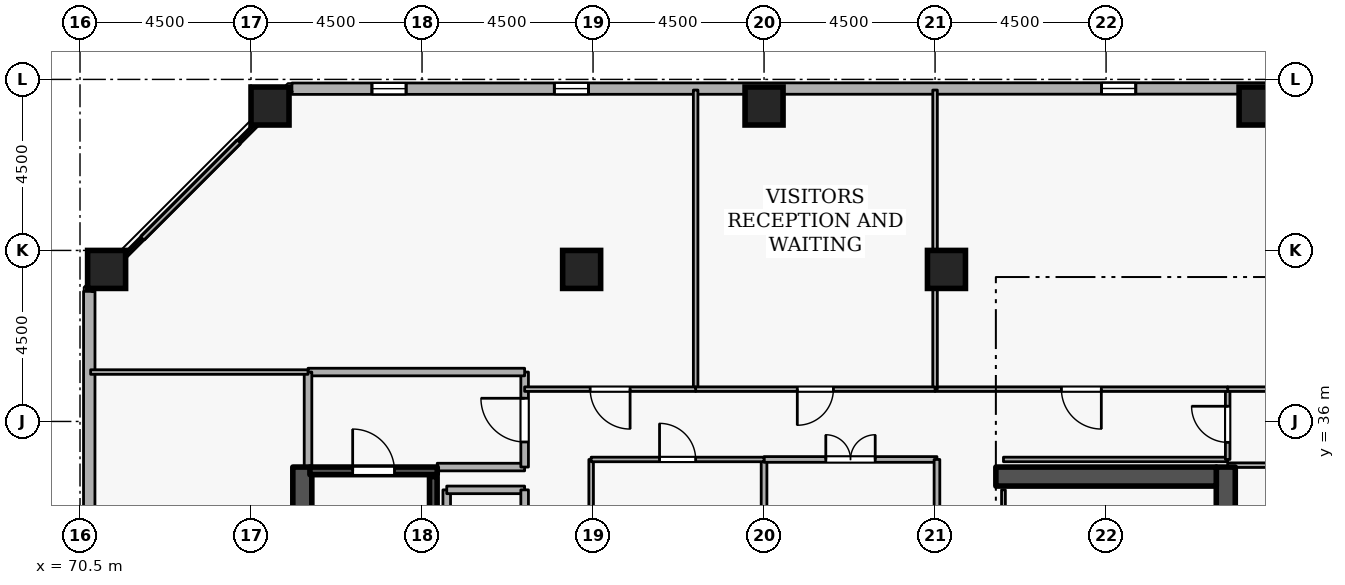
"""IFC4 building model, lengths in metres.
Left out: names, types, materials, properties, quantities, classifications, styles, units other than length and angle.
Written with IfcOpenShell. Run it as: python <this file> out.ifc"""

import sys

from ifc_helpers import new_model, si_unit, direction, frame, frame_2d, origin, origin_2d, place, context, subcontext, project, spatial, rectangle, extrude, element, fill, save


model = new_model("IFC4")
c1 = context("Model", 3, precision=1e-05, world=origin(), true_north=direction((0.0, 1.0)))
c2 = subcontext(c1, "Body", "Model", "MODEL_VIEW")
j1 = project(units=[si_unit("LENGTHUNIT", "METRE"), si_unit("PLANEANGLEUNIT", "RADIAN")], contexts=[c1])
p1 = place(None, origin())
s1 = spatial("IfcSite", under=j1, at=p1, CompositionType="ELEMENT")
p2 = place(p1, origin())
s2 = spatial("IfcBuilding", under=s1, at=p2, CompositionType="ELEMENT")
p3 = place(p2, frame((0.0, 0.0, 240.3)))
s3 = spatial("IfcBuildingStorey", under=s2, at=p3, CompositionType="ELEMENT", Elevation=240.3)
p4 = place(p3, frame((100.65, 19.2, 0.0), z_axis=(0.0, 0.0, 1.0), x_axis=(0.0, 1.0, 0.0)))
e1 = element("IfcWall", 1, at=p4, inside=s3, PredefinedType="SHEAR", context=c2, shape_type="SweptSolid", body=[
    extrude(rectangle(XDim=15.6, YDim=0.5, at=frame_2d((7.8, 0.0))), origin(), (0.0, 0.0, 1.0), 3.6),
])
p5 = place(p3, frame((94.6, 34.55, 0.0), z_axis=(0.0, 0.0, 1.0), x_axis=(1.0, 0.0, 0.0)))
e2 = element("IfcWall", 2, at=p5, inside=s3, PredefinedType="SHEAR", context=c2, shape_type="SweptSolid", body=[
    extrude(rectangle(XDim=5.8, YDim=0.5, at=frame_2d((2.9, 0.0))), origin(), (0.0, 0.0, 1.0), 3.6),
])
p6 = place(p3, frame((76.35, 19.2, 0.0), z_axis=(0.0, 0.0, 1.0), x_axis=(0.0, 1.0, 0.0)))
e3 = element("IfcWall", 3, at=p6, inside=s3, PredefinedType="SHEAR", context=c2, shape_type="SweptSolid", body=[
    extrude(rectangle(XDim=15.6, YDim=0.5, at=frame_2d((7.8, 0.0))), origin(), (0.0, 0.0, 1.0), 3.6),
])
for number, where, z_axis, x_axis in (
    (4, (101.5, 44.3, 0.0), (0.0, 0.0, 1.0), (1.0, 0.0, 0.0)),
    (5, (88.5, 44.3, 0.0), (0.0, 0.0, 1.0), (1.0, 0.0, 0.0)),
    (6, (75.5, 44.3, 0.0), (0.0, 0.0, 1.0), (1.0, 0.0, 0.0)),
    (7, (71.2, 40.0, 0.0), (0.0, 0.0, 1.0), (1.0, 0.0, 0.0)),
    (8, (93.3, 40.0, 0.0), (0.0, 0.0, 1.0), (1.0, 0.0, 0.0)),
    (9, (83.7, 40.0, 0.0), (0.0, 0.0, 1.0), (1.0, 0.0, 0.0)),
):
    element("IfcColumn", number, at=place(p3, frame(where, z_axis=z_axis, x_axis=x_axis)), inside=s3, PredefinedType="COLUMN", context=c2, shape_type="SweptSolid", body=[
        extrude(rectangle(XDim=1.0, YDim=1.0, at=origin_2d()), origin(), (0.0, 0.0, 1.0), 3.6),
    ])
p7 = place(p3, frame((109.681, 44.765, 0.0), z_axis=(0.0, 0.0, 1.0), x_axis=(-0.999999963872, -0.000268805477, 0.0)))
e10 = element("IfcWall", 10, at=p7, inside=s3, PredefinedType="STANDARD", context=c2, shape_type="SweptSolid", body=[
    extrude(rectangle(XDim=33.605, YDim=0.3, at=frame_2d((16.802, 0.0))), origin(), (0.0, 0.0, 1.0), 2.7),
])
p8 = place(p7, frame((1.8, 0.0, 0.72)))
e11 = element("IfcOpeningElement", 11, at=p8, cuts=e10, PredefinedType="OPENING", context=c2, shape_type="SweptSolid", body=[
    extrude(rectangle(XDim=0.9, YDim=1.75, at=frame_2d((0.45, 0.875))), frame((0.0, 0.16, 0.0), z_axis=(0.0, -1.0, 0.0), x_axis=(1.0, 0.0, 0.0)), (0.0, 0.0, 1.0), 0.32),
])
p9 = place(p7, frame((11.4, 0.0, 0.72)))
e12 = element("IfcOpeningElement", 12, at=p9, cuts=e10, PredefinedType="OPENING", context=c2, shape_type="SweptSolid", body=[
    extrude(rectangle(XDim=0.9, YDim=1.75, at=frame_2d((0.45, 0.875))), frame((0.0, 0.16, 0.0), z_axis=(0.0, -1.0, 0.0), x_axis=(1.0, 0.0, 0.0)), (0.0, 0.0, 1.0), 0.32),
])
p10 = place(p7, frame((25.8, 0.0, 0.72)))
e13 = element("IfcOpeningElement", 13, at=p10, cuts=e10, PredefinedType="OPENING", context=c2, shape_type="SweptSolid", body=[
    extrude(rectangle(XDim=0.9, YDim=1.75, at=frame_2d((0.45, 0.875))), frame((0.0, 0.16, 0.0), z_axis=(0.0, -1.0, 0.0), x_axis=(1.0, 0.0, 0.0)), (0.0, 0.0, 1.0), 0.32),
])
p11 = place(p7, frame((30.6, 0.0, 0.72)))
e14 = element("IfcOpeningElement", 14, at=p11, cuts=e10, PredefinedType="OPENING", context=c2, shape_type="SweptSolid", body=[
    extrude(rectangle(XDim=0.9, YDim=1.75, at=frame_2d((0.45, 0.875))), frame((0.0, 0.16, 0.0), z_axis=(0.0, -1.0, 0.0), x_axis=(1.0, 0.0, 0.0)), (0.0, 0.0, 1.0), 0.32),
])
p12 = place(p3, frame((70.744, 39.424, 0.0), z_axis=(0.0, 0.0, 1.0), x_axis=(-0.000268805477, -0.999999963872, 0.0)))
e15 = element("IfcWall", 15, at=p12, inside=s3, PredefinedType="STANDARD", context=c2, shape_type="SweptSolid", body=[
    extrude(rectangle(XDim=33.605, YDim=0.3, at=frame_2d((16.802, 0.0))), origin(), (0.0, 0.0, 1.0), 2.7),
])
p13 = place(p12, frame((6.6, 0.0, 0.72)))
e16 = element("IfcOpeningElement", 16, at=p13, cuts=e15, PredefinedType="OPENING", context=c2, shape_type="SweptSolid", body=[
    extrude(rectangle(XDim=0.9, YDim=1.75, at=frame_2d((0.45, 0.875))), frame((0.0, 0.16, 0.0), z_axis=(0.0, -1.0, 0.0), x_axis=(1.0, 0.0, 0.0)), (0.0, 0.0, 1.0), 0.32),
])
p14 = place(p12, frame((16.2, 0.0, 0.72)))
e17 = element("IfcOpeningElement", 17, at=p14, cuts=e15, PredefinedType="OPENING", context=c2, shape_type="SweptSolid", body=[
    extrude(rectangle(XDim=0.9, YDim=1.75, at=frame_2d((0.45, 0.875))), frame((0.0, 0.16, 0.0), z_axis=(0.0, -1.0, 0.0), x_axis=(1.0, 0.0, 0.0)), (0.0, 0.0, 1.0), 0.32),
])
p15 = place(p12, frame((21.0, 0.0, 0.72)))
e18 = element("IfcOpeningElement", 18, at=p15, cuts=e15, PredefinedType="OPENING", context=c2, shape_type="SweptSolid", body=[
    extrude(rectangle(XDim=0.9, YDim=1.75, at=frame_2d((0.45, 0.875))), frame((0.0, 0.16, 0.0), z_axis=(0.0, -1.0, 0.0), x_axis=(1.0, 0.0, 0.0)), (0.0, 0.0, 1.0), 0.32),
])
p16 = place(p12, frame((30.6, 0.0, 0.72)))
e19 = element("IfcOpeningElement", 19, at=p16, cuts=e15, PredefinedType="OPENING", context=c2, shape_type="SweptSolid", body=[
    extrude(rectangle(XDim=0.9, YDim=1.75, at=frame_2d((0.45, 0.875))), frame((0.0, 0.16, 0.0), z_axis=(0.0, -1.0, 0.0), x_axis=(1.0, 0.0, 0.0)), (0.0, 0.0, 1.0), 0.32),
])
p17 = place(p3, frame((76.55, 34.7, 0.0), z_axis=(0.0, 0.0, 1.0), x_axis=(1.0, 0.0, 0.0)))
e20 = element("IfcWall", 20, at=p17, inside=s3, PredefinedType="SHEAR", context=c2, shape_type="SweptSolid", body=[
    extrude(rectangle(XDim=3.35, YDim=0.2, at=frame_2d((1.675, 0.0))), origin(), (0.0, 0.0, 1.0), 3.6),
])
p18 = place(p17, frame((1.125, 0.0, 0.0)))
e21 = element("IfcOpeningElement", 21, at=p18, cuts=e20, PredefinedType="OPENING", context=c2, shape_type="SweptSolid", body=[
    extrude(rectangle(XDim=1.1, YDim=2.1, at=frame_2d((0.55, 1.05))), frame((0.0, 0.11, 0.0), z_axis=(0.0, -1.0, 0.0), x_axis=(1.0, 0.0, 0.0)), (0.0, 0.0, 1.0), 0.22),
])
p19 = place(p3, frame((79.797, 27.45, 0.0), z_axis=(0.0, 0.0, 1.0), x_axis=(0.0, 1.0, 0.0)))
e22 = element("IfcWall", 22, at=p19, inside=s3, PredefinedType="SHEAR", context=c2, shape_type="SweptSolid", body=[
    extrude(rectangle(XDim=7.1, YDim=0.2, at=frame_2d((3.55, 0.0))), origin(), (0.0, 0.0, 1.0), 3.6),
])
p20 = place(p3, frame((79.9, 34.8, 0.0), z_axis=(0.0, 0.0, 1.0), x_axis=(1.0, 0.0, 0.0)))
e23 = element("IfcWall", 23, at=p20, inside=s3, PredefinedType="STANDARD", context=c2, shape_type="SweptSolid", body=[
    extrude(rectangle(XDim=2.3, YDim=0.2, at=frame_2d((1.15, 0.0))), origin(), (0.0, 0.0, 1.0), 2.545),
])
p21 = place(p3, frame((82.2, 34.8, 0.0), z_axis=(0.0, 0.0, 1.0), x_axis=(0.0, 1.0, 0.0)))
e24 = element("IfcWall", 24, at=p21, inside=s3, PredefinedType="STANDARD", context=c2, shape_type="SweptSolid", body=[
    extrude(rectangle(XDim=2.5, YDim=0.2, at=frame_2d((1.25, 0.0))), origin(), (0.0, 0.0, 1.0), 3.34),
])
p22 = place(p21, frame((0.66, 0.0, 0.0)))
e25 = element("IfcOpeningElement", 25, at=p22, cuts=e24, PredefinedType="OPENING", context=c2, shape_type="SweptSolid", body=[
    extrude(rectangle(XDim=1.15, YDim=2.1, at=frame_2d((0.575, 1.05))), frame((0.0, 0.11, 0.0), z_axis=(0.0, -1.0, 0.0), x_axis=(1.0, 0.0, 0.0)), (0.0, 0.0, 1.0), 0.22),
])
p23 = place(p3, frame((82.2, 37.3, 0.0), z_axis=(0.0, 0.0, 1.0), x_axis=(-1.0, 0.0, 0.0)))
e26 = element("IfcWall", 26, at=p23, inside=s3, PredefinedType="STANDARD", context=c2, shape_type="SweptSolid", body=[
    extrude(rectangle(XDim=5.7, YDim=0.2, at=frame_2d((2.85, 0.0))), origin(), (0.0, 0.0, 1.0), 3.34),
])
p24 = place(p3, frame((76.5, 37.3, 0.0), z_axis=(0.0, 0.0, 1.0), x_axis=(0.0, -1.0, 0.0)))
e27 = element("IfcWall", 27, at=p24, inside=s3, PredefinedType="STANDARD", context=c2, shape_type="SweptSolid", body=[
    extrude(rectangle(XDim=2.5, YDim=0.2, at=frame_2d((1.25, 0.0))), origin(), (0.0, 0.0, 1.0), 3.34),
])
p25 = place(p3, frame((80.15, 31.85, 0.0), z_axis=(0.0, 0.0, 1.0), x_axis=(0.0, 1.0, 0.0)))
e28 = element("IfcWall", 28, at=p25, inside=s3, PredefinedType="STANDARD", context=c2, shape_type="SweptSolid", body=[
    extrude(rectangle(XDim=2.35, YDim=0.2, at=frame_2d((1.175, 0.0))), origin(), (0.0, 0.0, 1.0), 3.34),
])
p26 = place(p3, frame((80.15, 34.2, 0.0), z_axis=(0.0, 0.0, 1.0), x_axis=(1.0, 0.0, 0.0)))
e29 = element("IfcWall", 29, at=p26, inside=s3, PredefinedType="STANDARD", context=c2, shape_type="SweptSolid", body=[
    extrude(rectangle(XDim=2.05, YDim=0.2, at=frame_2d((1.025, 0.0))), origin(), (0.0, 0.0, 1.0), 2.545),
])
p27 = place(p3, frame((82.2, 34.2, 0.0), z_axis=(0.0, 0.0, 1.0), x_axis=(0.0, -1.0, 0.0)))
e30 = element("IfcWall", 30, at=p27, inside=s3, PredefinedType="STANDARD", context=c2, shape_type="SweptSolid", body=[
    extrude(rectangle(XDim=2.35, YDim=0.2, at=frame_2d((1.175, 0.0))), origin(), (0.0, 0.0, 1.0), 3.34),
])
p28 = place(p27, frame((0.6, 0.0, 0.0)))
e31 = element("IfcOpeningElement", 31, at=p28, cuts=e30, PredefinedType="OPENING", context=c2, shape_type="SweptSolid", body=[
    extrude(rectangle(XDim=1.15, YDim=2.1, at=frame_2d((0.575, 1.05))), frame((0.0, 0.11, 0.0), z_axis=(0.0, -1.0, 0.0), x_axis=(1.0, 0.0, 0.0)), (0.0, 0.0, 1.0), 0.22),
])
p29 = place(p3, frame((94.8, 32.05, 0.0), z_axis=(0.0, 0.0, 1.0), x_axis=(0.0, 1.0, 0.0)))
e32 = element("IfcWall", 32, at=p29, inside=s3, PredefinedType="PARTITIONING", context=c2, shape_type="SweptSolid", body=[
    extrude(rectangle(XDim=2.15, YDim=0.1, at=frame_2d((1.075, 0.0))), origin(), (0.0, 0.0, 1.0), 3.34),
])
p30 = place(p29, frame((0.6, 0.0, 0.0)))
e33 = element("IfcOpeningElement", 33, at=p30, cuts=e32, PredefinedType="OPENING", context=c2, shape_type="SweptSolid", body=[
    extrude(rectangle(XDim=0.95, YDim=2.1, at=frame_2d((0.475, 1.05))), frame((0.0, 0.06, 0.0), z_axis=(0.0, -1.0, 0.0), x_axis=(1.0, 0.0, 0.0)), (0.0, 0.0, 1.0), 0.12),
])
p31 = place(p3, frame((94.8, 35.0, 0.0), z_axis=(0.0, 0.0, 1.0), x_axis=(1.0, 0.0, 0.0)))
e34 = element("IfcWall", 34, at=p31, inside=s3, PredefinedType="PARTITIONING", context=c2, shape_type="SweptSolid", body=[
    extrude(rectangle(XDim=5.9, YDim=0.12, at=frame_2d((2.95, 0.0))), origin(), (0.0, 0.0, 1.0), 3.34),
])
p32 = place(p3, frame((100.7, 35.0, 0.0), z_axis=(0.0, 0.0, 1.0), x_axis=(0.0, 1.0, 0.0)))
e35 = element("IfcWall", 35, at=p32, inside=s3, PredefinedType="PARTITIONING", context=c2, shape_type="SweptSolid", body=[
    extrude(rectangle(XDim=1.85, YDim=0.12, at=frame_2d((0.925, 0.0))), origin(), (0.0, 0.0, 1.0), 3.34),
])
p33 = place(p32, frame((0.45, 0.0, 0.0)))
e36 = element("IfcOpeningElement", 36, at=p33, cuts=e35, PredefinedType="OPENING", context=c2, shape_type="SweptSolid", body=[
    extrude(rectangle(XDim=0.95, YDim=2.1, at=frame_2d((0.475, 1.05))), frame((0.0, 0.07, 0.0), z_axis=(0.0, -1.0, 0.0), x_axis=(1.0, 0.0, 0.0)), (0.0, 0.0, 1.0), 0.14),
])
for number, where, z_axis, x_axis in (
    (37, (100.7, 36.85, 0.0), (0.0, 0.0, 1.0), (1.0, 0.0, 0.0)),
    (38, (112.22, 34.85, 0.0), (0.0, 0.0, 1.0), (-1.0, 0.0, 0.0)),
):
    element("IfcWall", number, at=place(p3, frame(where, z_axis=z_axis, x_axis=x_axis)), inside=s3, PredefinedType="PARTITIONING", context=c2, shape_type="SweptSolid", body=[
        extrude(rectangle(XDim=11.52, YDim=0.12, at=frame_2d((5.76, 0.0))), origin(), (0.0, 0.0, 1.0), 3.34),
    ])
p34 = place(p3, frame((100.7, 36.85, 0.0), z_axis=(0.0, 0.0, 1.0), x_axis=(-1.0, 0.0, 0.0)))
e39 = element("IfcWall", 39, at=p34, inside=s3, PredefinedType="PARTITIONING", context=c2, shape_type="SweptSolid", body=[
    extrude(rectangle(XDim=7.7, YDim=0.12, at=frame_2d((3.85, 0.0))), origin(), (0.0, 0.0, 1.0), 3.34),
])
p35 = place(p34, frame((3.325, 0.0, 0.0)))
e40 = element("IfcOpeningElement", 40, at=p35, cuts=e39, PredefinedType="OPENING", context=c2, shape_type="SweptSolid", body=[
    extrude(rectangle(XDim=1.05, YDim=2.1, at=frame_2d((0.525, 1.05))), frame((0.0, 0.07, 0.0), z_axis=(0.0, -1.0, 0.0), x_axis=(1.0, 0.0, 0.0)), (0.0, 0.0, 1.0), 0.14),
])
for number, where, z_axis, x_axis in (
    (41, (93.0, 36.85, 0.0), (0.0, 0.0, 1.0), (0.0, 1.0, 0.0)),
    (42, (86.7, 36.85, 0.0), (0.0, 0.0, 1.0), (0.0, 1.0, 0.0)),
):
    element("IfcWall", number, at=place(p3, frame(where, z_axis=z_axis, x_axis=x_axis)), inside=s3, PredefinedType="PARTITIONING", context=c2, shape_type="SweptSolid", body=[
        extrude(rectangle(XDim=7.87, YDim=0.12, at=frame_2d((3.935, 0.0))), origin(), (0.0, 0.0, 1.0), 3.34),
    ])
p36 = place(p3, frame((93.0, 36.85, 0.0), z_axis=(0.0, 0.0, 1.0), x_axis=(-1.0, 0.0, 0.0)))
e43 = element("IfcWall", 43, at=p36, inside=s3, PredefinedType="PARTITIONING", context=c2, shape_type="SweptSolid", body=[
    extrude(rectangle(XDim=6.3, YDim=0.12, at=frame_2d((3.15, 0.0))), origin(), (0.0, 0.0, 1.0), 3.34),
])
p37 = place(p36, frame((2.675, 0.0, 0.0)))
e44 = element("IfcOpeningElement", 44, at=p37, cuts=e43, PredefinedType="OPENING", context=c2, shape_type="SweptSolid", body=[
    extrude(rectangle(XDim=0.95, YDim=2.1, at=frame_2d((0.475, 1.05))), frame((0.0, 0.07, 0.0), z_axis=(0.0, -1.0, 0.0), x_axis=(1.0, 0.0, 0.0)), (0.0, 0.0, 1.0), 0.14),
])
p38 = place(p3, frame((76.5, 37.3, 0.0), z_axis=(0.0, 0.0, 1.0), x_axis=(-1.0, 0.0, 0.0)))
e45 = element("IfcWall", 45, at=p38, inside=s3, PredefinedType="PARTITIONING", context=c2, shape_type="SweptSolid", body=[
    extrude(rectangle(XDim=5.72, YDim=0.12, at=frame_2d((2.86, 0.0))), origin(), (0.0, 0.0, 1.0), 3.34),
])
p39 = place(p3, frame((70.78, 39.456, 0.0), z_axis=(0.0, 0.0, 1.0), x_axis=(0.707106781187, 0.707106781187, 0.0)))
e46 = element("IfcWall", 46, at=p39, inside=s3, PredefinedType="PARTITIONING", context=c2, shape_type="SweptSolid", body=[
    extrude(rectangle(XDim=7.444, YDim=0.12, at=frame_2d((3.722, 0.0))), origin(), (0.0, 0.0, 1.0), 3.34),
])
p40 = place(p3, frame((86.7, 36.85, 0.0), z_axis=(0.0, 0.0, 1.0), x_axis=(-1.0, 0.0, 0.0)))
e47 = element("IfcWall", 47, at=p40, inside=s3, PredefinedType="PARTITIONING", context=c2, shape_type="SweptSolid", body=[
    extrude(rectangle(XDim=4.5, YDim=0.12, at=frame_2d((2.25, 0.0))), origin(), (0.0, 0.0, 1.0), 3.34),
])
p41 = place(p40, frame((1.725, 0.0, 0.0)))
e48 = element("IfcOpeningElement", 48, at=p41, cuts=e47, PredefinedType="OPENING", context=c2, shape_type="SweptSolid", body=[
    extrude(rectangle(XDim=1.05, YDim=2.1, at=frame_2d((0.525, 1.05))), frame((0.0, 0.07, 0.0), z_axis=(0.0, -1.0, 0.0), x_axis=(1.0, 0.0, 0.0)), (0.0, 0.0, 1.0), 0.14),
])
p42 = place(p3, frame((88.5, 32.2, 0.0), z_axis=(0.0, 0.0, 1.0), x_axis=(0.0, 1.0, 0.0)))
e49 = element("IfcWall", 49, at=p42, inside=s3, PredefinedType="PARTITIONING", context=c2, shape_type="SweptSolid", body=[
    extrude(rectangle(XDim=2.8, YDim=0.15, at=frame_2d((1.4, 0.0))), origin(), (0.0, 0.0, 1.0), 2.878),
])
p43 = place(p3, frame((88.5, 35.0, 0.0), z_axis=(0.0, 0.0, 1.0), x_axis=(1.0, 0.0, 0.0)))
e50 = element("IfcWall", 50, at=p43, inside=s3, PredefinedType="PARTITIONING", context=c2, shape_type="SweptSolid", body=[
    extrude(rectangle(XDim=4.55, YDim=0.15, at=frame_2d((2.275, 0.0))), origin(), (0.0, 0.0, 1.0), 3.34),
])
p44 = place(p43, frame((1.625, 0.0, 0.0)))
e51 = element("IfcOpeningElement", 51, at=p44, cuts=e50, PredefinedType="OPENING", context=c2, shape_type="SweptSolid", body=[
    extrude(rectangle(XDim=1.3, YDim=2.12, at=frame_2d((0.65, 1.06))), frame((0.0, 0.085, 0.0), z_axis=(0.0, -1.0, 0.0), x_axis=(1.0, 0.0, 0.0)), (0.0, 0.0, 1.0), 0.17),
])
p45 = place(p3, frame((93.05, 35.0, 0.0), z_axis=(0.0, 0.0, 1.0), x_axis=(0.0, -1.0, 0.0)))
e52 = element("IfcWall", 52, at=p45, inside=s3, PredefinedType="PARTITIONING", context=c2, shape_type="SweptSolid", body=[
    extrude(rectangle(XDim=2.8, YDim=0.15, at=frame_2d((1.4, 0.0))), origin(), (0.0, 0.0, 1.0), 3.34),
])
p46 = place(p3, frame((83.95, 32.2, 0.0), z_axis=(0.0, 0.0, 1.0), x_axis=(0.0, 1.0, 0.0)))
e53 = element("IfcWall", 53, at=p46, inside=s3, PredefinedType="PARTITIONING", context=c2, shape_type="SweptSolid", body=[
    extrude(rectangle(XDim=2.8, YDim=0.12, at=frame_2d((1.4, 0.0))), origin(), (0.0, 0.0, 1.0), 3.34),
])
p47 = place(p3, frame((83.95, 35.0, 0.0), z_axis=(0.0, 0.0, 1.0), x_axis=(1.0, 0.0, 0.0)))
e54 = element("IfcWall", 54, at=p47, inside=s3, PredefinedType="PARTITIONING", context=c2, shape_type="SweptSolid", body=[
    extrude(rectangle(XDim=4.55, YDim=0.12, at=frame_2d((2.275, 0.0))), origin(), (0.0, 0.0, 1.0), 3.34),
])
p48 = place(p47, frame((1.8, 0.0, 0.0)))
e55 = element("IfcOpeningElement", 55, at=p48, cuts=e54, PredefinedType="OPENING", context=c2, shape_type="SweptSolid", body=[
    extrude(rectangle(XDim=0.95, YDim=2.1, at=frame_2d((0.475, 1.05))), frame((0.0, 0.07, 0.0), z_axis=(0.0, -1.0, 0.0), x_axis=(1.0, 0.0, 0.0)), (0.0, 0.0, 1.0), 0.14),
])
p49 = place(p9, origin())
e56 = element("IfcWindow", 56, at=p49, inside=s3, PartitioningType="SINGLE_PANEL", PredefinedType="WINDOW", context=c2, shape_type="SweptSolid", body=[
    extrude(rectangle(XDim=0.9, YDim=1.75, at=frame_2d((0.45, 0.875))), frame((0.0, 0.03, 0.0), z_axis=(0.0, -1.0, 0.0), x_axis=(1.0, 0.0, 0.0)), (0.0, 0.0, 1.0), 0.06),
])
fill(e12, e56)
p50 = place(p10, origin())
e57 = element("IfcWindow", 57, at=p50, inside=s3, PartitioningType="SINGLE_PANEL", PredefinedType="WINDOW", context=c2, shape_type="SweptSolid", body=[
    extrude(rectangle(XDim=0.9, YDim=1.75, at=frame_2d((0.45, 0.875))), frame((0.0, 0.03, 0.0), z_axis=(0.0, -1.0, 0.0), x_axis=(1.0, 0.0, 0.0)), (0.0, 0.0, 1.0), 0.06),
])
fill(e13, e57)
p51 = place(p11, origin())
e58 = element("IfcWindow", 58, at=p51, inside=s3, PartitioningType="SINGLE_PANEL", PredefinedType="WINDOW", context=c2, shape_type="SweptSolid", body=[
    extrude(rectangle(XDim=0.9, YDim=1.75, at=frame_2d((0.45, 0.875))), frame((0.0, 0.03, 0.0), z_axis=(0.0, -1.0, 0.0), x_axis=(1.0, 0.0, 0.0)), (0.0, 0.0, 1.0), 0.06),
])
fill(e14, e58)
p52 = place(p18, origin())
e59 = element("IfcDoor", 59, at=p52, inside=s3, OperationType="SINGLE_SWING_LEFT", PredefinedType="DOOR", context=c2, shape_type="SweptSolid", body=[
    extrude(rectangle(XDim=1.1, YDim=2.1, at=frame_2d((0.55, 1.05))), frame((0.0, 0.025, 0.0), z_axis=(0.0, -1.0, 0.0), x_axis=(1.0, 0.0, 0.0)), (0.0, 0.0, 1.0), 0.05),
])
fill(e21, e59)
p53 = place(p22, origin())
e60 = element("IfcDoor", 60, at=p53, inside=s3, OperationType="SINGLE_SWING_RIGHT", PredefinedType="DOOR", context=c2, shape_type="SweptSolid", body=[
    extrude(rectangle(XDim=1.15, YDim=2.1, at=frame_2d((0.575, 1.05))), frame((0.0, 0.025, 0.0), z_axis=(0.0, -1.0, 0.0), x_axis=(1.0, 0.0, 0.0)), (0.0, 0.0, 1.0), 0.05),
])
fill(e25, e60)
p54 = place(p33, origin())
e61 = element("IfcDoor", 61, at=p54, inside=s3, OperationType="SINGLE_SWING_RIGHT", PredefinedType="DOOR", context=c2, shape_type="SweptSolid", body=[
    extrude(rectangle(XDim=0.95, YDim=2.1, at=frame_2d((0.475, 1.05))), frame((0.0, 0.025, 0.0), z_axis=(0.0, -1.0, 0.0), x_axis=(1.0, 0.0, 0.0)), (0.0, 0.0, 1.0), 0.05),
])
fill(e36, e61)
p55 = place(p35, origin())
e62 = element("IfcDoor", 62, at=p55, inside=s3, OperationType="SINGLE_SWING_LEFT", PredefinedType="DOOR", context=c2, shape_type="SweptSolid", body=[
    extrude(rectangle(XDim=1.05, YDim=2.1, at=frame_2d((0.525, 1.05))), frame((0.0, 0.025, 0.0), z_axis=(0.0, -1.0, 0.0), x_axis=(1.0, 0.0, 0.0)), (0.0, 0.0, 1.0), 0.05),
])
fill(e40, e62)
p56 = place(p37, origin())
e63 = element("IfcDoor", 63, at=p56, inside=s3, OperationType="SINGLE_SWING_RIGHT", PredefinedType="DOOR", context=c2, shape_type="SweptSolid", body=[
    extrude(rectangle(XDim=0.95, YDim=2.1, at=frame_2d((0.475, 1.05))), frame((0.0, 0.025, 0.0), z_axis=(0.0, -1.0, 0.0), x_axis=(1.0, 0.0, 0.0)), (0.0, 0.0, 1.0), 0.05),
])
fill(e44, e63)
p57 = place(p41, origin())
e64 = element("IfcDoor", 64, at=p57, inside=s3, OperationType="SINGLE_SWING_LEFT", PredefinedType="DOOR", context=c2, shape_type="SweptSolid", body=[
    extrude(rectangle(XDim=1.05, YDim=2.1, at=frame_2d((0.525, 1.05))), frame((0.0, 0.025, 0.0), z_axis=(0.0, -1.0, 0.0), x_axis=(1.0, 0.0, 0.0)), (0.0, 0.0, 1.0), 0.05),
])
fill(e48, e64)
p58 = place(p44, origin())
e65 = element("IfcDoor", 65, at=p58, inside=s3, OperationType="DOUBLE_DOOR_SINGLE_SWING", PredefinedType="DOOR", context=c2, shape_type="SweptSolid", body=[
    extrude(rectangle(XDim=1.3, YDim=2.12, at=frame_2d((0.65, 1.06))), frame((0.0, 0.025, 0.0), z_axis=(0.0, -1.0, 0.0), x_axis=(1.0, 0.0, 0.0)), (0.0, 0.0, 1.0), 0.05),
])
fill(e51, e65)
p59 = place(p48, origin())
e66 = element("IfcDoor", 66, at=p59, inside=s3, OperationType="SINGLE_SWING_LEFT", PredefinedType="DOOR", context=c2, shape_type="SweptSolid", body=[
    extrude(rectangle(XDim=0.95, YDim=2.1, at=frame_2d((0.475, 1.05))), frame((0.0, 0.025, 0.0), z_axis=(0.0, -1.0, 0.0), x_axis=(1.0, 0.0, 0.0)), (0.0, 0.0, 1.0), 0.05),
])
fill(e55, e66)
save(model, sys.argv[1])
